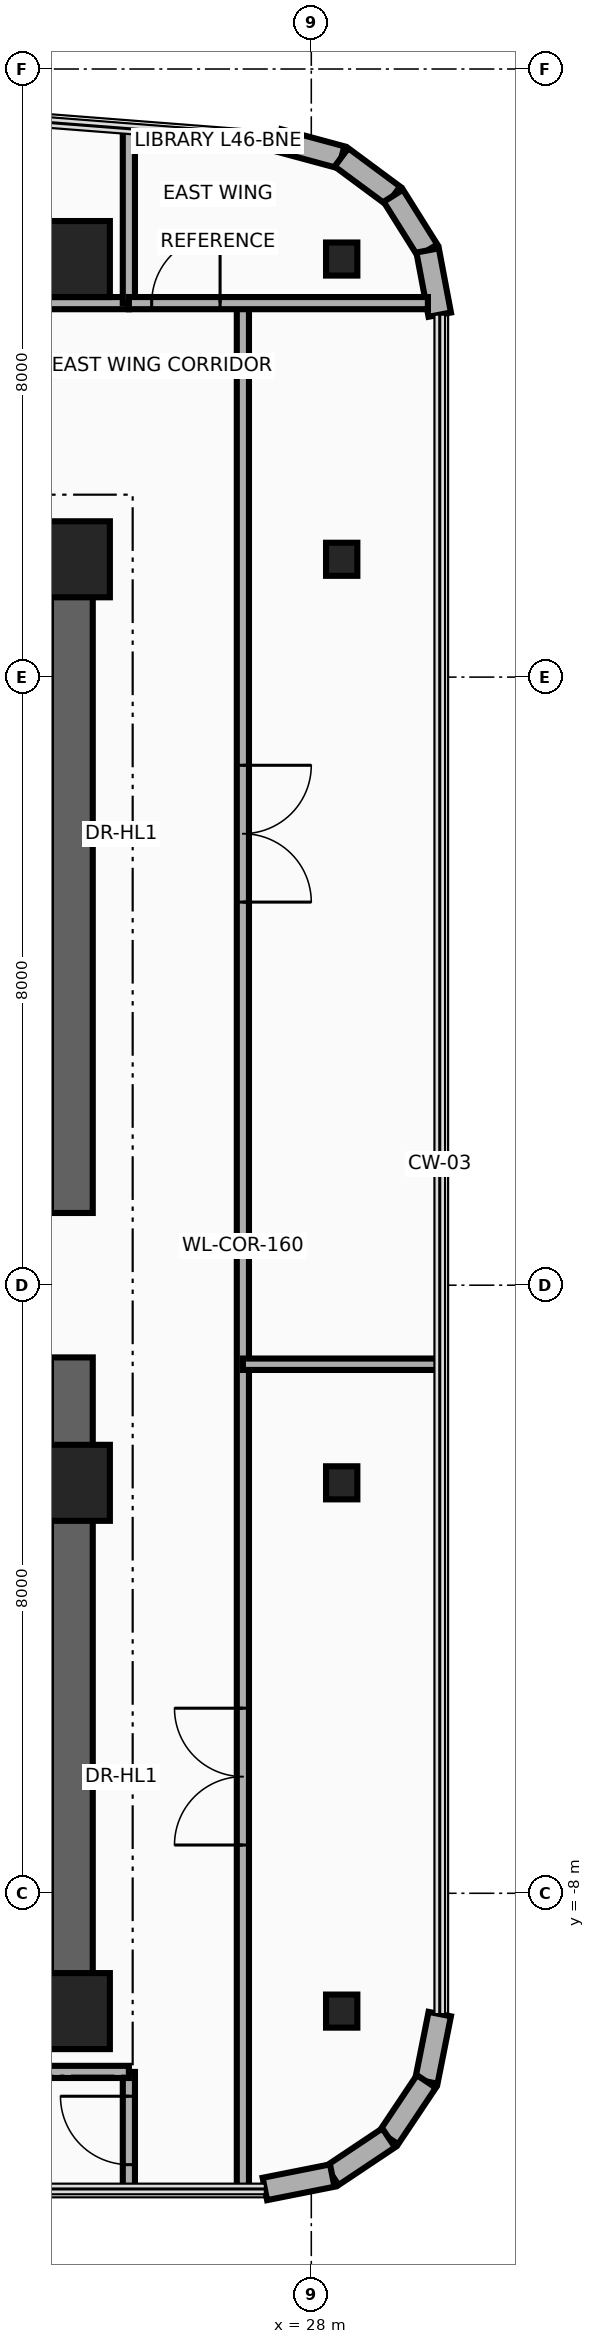
"""IFC4 building model, lengths in metres.
Left out: names, types, materials, properties, quantities, classifications, styles, units other than length and angle.
Written with IfcOpenShell. Run it as: python <this file> out.ifc"""

import sys

from ifc_helpers import new_model, si_unit, direction, frame, frame_2d, origin, origin_2d, place, context, subcontext, project, spatial, rectangle, i_section, extrude, source, transform, mapped, element, fill, save


model = new_model("IFC4")
c1 = context("Model", 3, precision=1e-05, world=origin(), true_north=direction((0.0, 1.0)))
c2 = subcontext(c1, "Body", "Model", "MODEL_VIEW")
j1 = project(units=[si_unit("LENGTHUNIT", "METRE"), si_unit("PLANEANGLEUNIT", "RADIAN")], contexts=[c1])
p1 = place(None, origin())
s1 = spatial("IfcSite", under=j1, at=p1, CompositionType="ELEMENT")
p2 = place(p1, origin())
s2 = spatial("IfcBuilding", under=s1, at=p2, CompositionType="ELEMENT")
p3 = place(p2, frame((0.0, 0.0, 180.5)))
s3 = spatial("IfcBuildingStorey", under=s2, at=p3, CompositionType="ELEMENT", Elevation=180.5)
for number, where, z_axis, x_axis in (
    (1, (24.85, -9.825, 0.0), (0.0, 0.0, 1.0), (0.0, 1.0, 0.0)),
    (2, (24.85, 0.95, 0.0), (0.0, 0.0, 1.0), (0.0, 1.0, 0.0)),
):
    element("IfcWall", number, at=place(p3, frame(where, z_axis=z_axis, x_axis=x_axis)), inside=s3, PredefinedType="SHEAR", context=c2, shape_type="SweptSolid", body=[
        extrude(rectangle(XDim=8.875, YDim=0.55, at=frame_2d((4.438, 0.0))), origin(), (0.0, 0.0, 1.0), 3.63),
    ])
for number, where, z_axis, x_axis in (
    (3, (15.85, 9.55, 0.0), (0.0, 0.0, 1.0), (1.0, 0.0, 0.0)),
    (4, (15.85, -9.55, 0.0), (0.0, 0.0, 1.0), (1.0, 0.0, 0.0)),
):
    element("IfcWall", number, at=place(p3, frame(where, z_axis=z_axis, x_axis=x_axis)), inside=s3, PredefinedType="SHEAR", context=c2, shape_type="SweptSolid", body=[
        extrude(rectangle(XDim=9.0, YDim=0.55, at=frame_2d((4.5, 0.0))), origin(), (0.0, 0.0, 1.0), 3.63),
    ])
m1 = source(origin(), c2, "Body", "SweptSolid", [
    extrude(rectangle(XDim=1.0, YDim=1.0, at=origin_2d()), origin(), (0.0, 0.0, 1.0), 3.95),
])
p4 = place(p3, frame((24.85, -9.55, 0.0), z_axis=(0.0, 0.0, 1.0), x_axis=(1.0, 0.0, 0.0)))
e5 = element("IfcColumn", 5, at=p4, inside=s3, PredefinedType="COLUMN", context=c2, shape_type="MappedRepresentation", body=[
    mapped(m1, transform((0.0, 0.0, 0.0), x_axis=(1.0, 0.0, 0.0), y_axis=(0.0, 1.0, 0.0), z_axis=(0.0, 0.0, 1.0), scale=1.0)),
])
m2 = source(origin(), c2, "Body", "SweptSolid", [
    extrude(i_section(OverallWidth=0.412, OverallDepth=0.435, WebThickness=0.036, FlangeThickness=0.057, at=origin_2d()), origin(), (0.0, 0.0, 1.0), 3.95),
])
p5 = place(p3, frame((28.4, -9.55, 0.0), z_axis=(0.0, 0.0, 1.0), x_axis=(1.0, 0.0, 0.0)))
e6 = element("IfcColumn", 6, at=p5, inside=s3, PredefinedType="COLUMN", context=c2, shape_type="MappedRepresentation", body=[
    mapped(m2, transform((0.0, 0.0, 0.0), x_axis=(1.0, 0.0, 0.0), y_axis=(0.0, 1.0, 0.0), z_axis=(0.0, 0.0, 1.0), scale=1.0)),
])
p6 = place(p3, frame((24.85, -2.6, 0.0), z_axis=(0.0, 0.0, 1.0), x_axis=(1.0, 0.0, 0.0)))
e7 = element("IfcColumn", 7, at=p6, inside=s3, PredefinedType="COLUMN", context=c2, shape_type="MappedRepresentation", body=[
    mapped(m1, transform((0.0, 0.0, 0.0), x_axis=(1.0, 0.0, 0.0), y_axis=(0.0, 1.0, 0.0), z_axis=(0.0, 0.0, 1.0), scale=1.0)),
])
p7 = place(p3, frame((28.4, -2.6, 0.0), z_axis=(0.0, 0.0, 1.0), x_axis=(1.0, 0.0, 0.0)))
e8 = element("IfcColumn", 8, at=p7, inside=s3, PredefinedType="COLUMN", context=c2, shape_type="MappedRepresentation", body=[
    mapped(m2, transform((0.0, 0.0, 0.0), x_axis=(1.0, 0.0, 0.0), y_axis=(0.0, 1.0, 0.0), z_axis=(0.0, 0.0, 1.0), scale=1.0)),
])
p8 = place(p3, frame((24.85, 9.55, 0.0), z_axis=(0.0, 0.0, 1.0), x_axis=(1.0, 0.0, 0.0)))
e9 = element("IfcColumn", 9, at=p8, inside=s3, PredefinedType="COLUMN", context=c2, shape_type="MappedRepresentation", body=[
    mapped(m1, transform((0.0, 0.0, 0.0), x_axis=(1.0, 0.0, 0.0), y_axis=(0.0, 1.0, 0.0), z_axis=(0.0, 0.0, 1.0), scale=1.0)),
])
p9 = place(p3, frame((28.4, 9.55, 0.0), z_axis=(0.0, 0.0, 1.0), x_axis=(1.0, 0.0, 0.0)))
e10 = element("IfcColumn", 10, at=p9, inside=s3, PredefinedType="COLUMN", context=c2, shape_type="MappedRepresentation", body=[
    mapped(m2, transform((0.0, 0.0, 0.0), x_axis=(1.0, 0.0, 0.0), y_axis=(0.0, 1.0, 0.0), z_axis=(0.0, 0.0, 1.0), scale=1.0)),
])
p10 = place(p3, frame((24.85, 13.5, 0.0), z_axis=(0.0, 0.0, 1.0), x_axis=(1.0, 0.0, 0.0)))
e11 = element("IfcColumn", 11, at=p10, inside=s3, PredefinedType="COLUMN", context=c2, shape_type="MappedRepresentation", body=[
    mapped(m1, transform((0.0, 0.0, 0.0), x_axis=(1.0, 0.0, 0.0), y_axis=(0.0, 1.0, 0.0), z_axis=(0.0, 0.0, 1.0), scale=1.0)),
])
p11 = place(p3, frame((28.4, 13.5, 0.0), z_axis=(0.0, 0.0, 1.0), x_axis=(1.0, 0.0, 0.0)))
e12 = element("IfcColumn", 12, at=p11, inside=s3, PredefinedType="COLUMN", context=c2, shape_type="MappedRepresentation", body=[
    mapped(m2, transform((0.0, 0.0, 0.0), x_axis=(1.0, 0.0, 0.0), y_axis=(0.0, 1.0, 0.0), z_axis=(0.0, 0.0, 1.0), scale=1.0)),
])
p12 = place(p3, frame((27.566, 15.062, 0.0), z_axis=(0.0, 0.0, 1.0), x_axis=(0.965357594382, -0.260930479187, 0.0)))
e13 = element("IfcWall", 13, at=p12, inside=s3, PredefinedType="SOLIDWALL", context=c2, shape_type="SweptSolid", body=[
    extrude(rectangle(XDim=0.86, YDim=0.3, at=frame_2d((0.43, 0.0))), origin(), (0.0, 0.0, 1.0), 3.63),
])
p13 = place(p3, frame((28.396, 14.838, 0.0), z_axis=(0.0, 0.0, 1.0), x_axis=(0.803847397988, -0.594835574548, 0.0)))
e14 = element("IfcWall", 14, at=p13, inside=s3, PredefinedType="SOLIDWALL", context=c2, shape_type="SweptSolid", body=[
    extrude(rectangle(XDim=0.849, YDim=0.3, at=frame_2d((0.425, 0.0))), origin(), (0.0, 0.0, 1.0), 3.63),
])
p14 = place(p3, frame((29.079, 14.333, 0.0), z_axis=(0.0, 0.0, 1.0), x_axis=(0.53134147342, -0.847157741288, 0.0)))
e15 = element("IfcWall", 15, at=p14, inside=s3, PredefinedType="SOLIDWALL", context=c2, shape_type="SweptSolid", body=[
    extrude(rectangle(XDim=0.85, YDim=0.3, at=frame_2d((0.425, 0.0))), origin(), (0.0, 0.0, 1.0), 3.63),
])
p15 = place(p3, frame((29.531, 13.613, 0.0), z_axis=(0.0, 0.0, 1.0), x_axis=(0.185402686284, -0.982662629756, 0.0)))
e16 = element("IfcWall", 16, at=p15, inside=s3, PredefinedType="SOLIDWALL", context=c2, shape_type="SweptSolid", body=[
    extrude(rectangle(XDim=0.86, YDim=0.3, at=frame_2d((0.43, 0.0))), origin(), (0.0, 0.0, 1.0), 3.63),
])
p16 = place(p3, frame((29.69, -9.589, 0.0), z_axis=(0.0, 0.0, 1.0), x_axis=(-0.195025152871, -0.980798241101, 0.0)))
e17 = element("IfcWall", 17, at=p16, inside=s3, PredefinedType="SOLIDWALL", context=c2, shape_type="SweptSolid", body=[
    extrude(rectangle(XDim=0.904, YDim=0.3, at=frame_2d((0.452, 0.0))), origin(), (0.0, 0.0, 1.0), 3.63),
])
p17 = place(p3, frame((29.514, -10.476, 0.0), z_axis=(0.0, 0.0, 1.0), x_axis=(-0.555520488502, -0.831502848374, 0.0)))
e18 = element("IfcWall", 18, at=p17, inside=s3, PredefinedType="SOLIDWALL", context=c2, shape_type="SweptSolid", body=[
    extrude(rectangle(XDim=0.893, YDim=0.3, at=frame_2d((0.446, 0.0))), origin(), (0.0, 0.0, 1.0), 3.63),
])
p18 = place(p3, frame((29.018, -11.218, 0.0), z_axis=(0.0, 0.0, 1.0), x_axis=(-0.83158722889, -0.555394167009, 0.0)))
e19 = element("IfcWall", 19, at=p18, inside=s3, PredefinedType="SOLIDWALL", context=c2, shape_type="SweptSolid", body=[
    extrude(rectangle(XDim=0.893, YDim=0.3, at=frame_2d((0.446, 0.0))), origin(), (0.0, 0.0, 1.0), 3.63),
])
p19 = place(p3, frame((28.275, -11.714, 0.0), z_axis=(0.0, 0.0, 1.0), x_axis=(-0.980787963133, -0.19507683454, 0.0)))
e20 = element("IfcWall", 20, at=p19, inside=s3, PredefinedType="SOLIDWALL", context=c2, shape_type="SweptSolid", body=[
    extrude(rectangle(XDim=0.904, YDim=0.3, at=frame_2d((0.452, 0.0))), origin(), (0.0, 0.0, 1.0), 3.63),
])
p20 = place(p3, frame((15.4, 12.92, 0.0), z_axis=(0.0, 0.0, 1.0), x_axis=(1.0, 0.0, 0.0)))
e21 = element("IfcWall", 21, at=p20, inside=s3, PredefinedType="PARTITIONING", context=c2, shape_type="SweptSolid", body=[
    extrude(rectangle(XDim=10.2, YDim=0.16, at=frame_2d((5.1, 0.0))), origin(), (0.0, 0.0, 1.0), 3.004),
])
p21 = place(p20, frame((4.65, 0.0, 0.0)))
e22 = element("IfcOpeningElement", 22, at=p21, cuts=e21, PredefinedType="OPENING", context=c2, shape_type="SweptSolid", body=[
    extrude(rectangle(XDim=0.9, YDim=2.1, at=frame_2d((0.45, 1.05))), frame((0.0, 0.095, 0.0), z_axis=(0.0, -1.0, 0.0), x_axis=(1.0, 0.0, 0.0)), (0.0, 0.0, 1.0), 0.19),
])
p22 = place(p3, frame((25.6, 12.92, 0.0), z_axis=(0.0, 0.0, 1.0), x_axis=(0.0, 1.0, 0.0)))
e23 = element("IfcWall", 23, at=p22, inside=s3, PredefinedType="PARTITIONING", context=c2, shape_type="SweptSolid", body=[
    extrude(rectangle(XDim=2.295, YDim=0.16, at=frame_2d((1.147, 0.0))), origin(), (0.0, 0.0, 1.0), 2.665),
])
p23 = place(p3, frame((25.6, -11.89, 0.0), z_axis=(0.0, 0.0, 1.0), x_axis=(0.0, 1.0, 0.0)))
e24 = element("IfcWall", 24, at=p23, inside=s3, PredefinedType="PARTITIONING", context=c2, shape_type="SweptSolid", body=[
    extrude(rectangle(XDim=1.54, YDim=0.16, at=frame_2d((0.77, 0.0))), origin(), (0.0, 0.0, 1.0), 3.63),
])
p24 = place(p23, frame((0.32, 0.0, 0.0)))
e25 = element("IfcOpeningElement", 25, at=p24, cuts=e24, PredefinedType="OPENING", context=c2, shape_type="SweptSolid", body=[
    extrude(rectangle(XDim=0.9, YDim=2.1, at=frame_2d((0.45, 1.05))), frame((0.0, 0.095, 0.0), z_axis=(0.0, -1.0, 0.0), x_axis=(1.0, 0.0, 0.0)), (0.0, 0.0, 1.0), 0.19),
])
p25 = place(p3, frame((13.889, -10.35, 0.0), z_axis=(0.0, 0.0, 1.0), x_axis=(1.0, 0.0, 0.0)))
e26 = element("IfcWall", 26, at=p25, inside=s3, PredefinedType="PARTITIONING", context=c2, shape_type="SweptSolid", body=[
    extrude(rectangle(XDim=11.711, YDim=0.16, at=frame_2d((5.855, 0.0))), origin(), (0.0, 0.0, 1.0), 3.63),
])
p26 = place(p3, frame((27.1, -11.89, 0.0), z_axis=(0.0, 0.0, 1.0), x_axis=(0.0, 1.0, 0.0)))
e27 = element("IfcWall", 27, at=p26, inside=s3, PredefinedType="PARTITIONING", context=c2, shape_type="SweptSolid", body=[
    extrude(rectangle(XDim=24.81, YDim=0.16, at=frame_2d((12.405, 0.0))), origin(), (0.0, 0.0, 1.0), 2.665),
])
p27 = place(p26, frame((4.525, 0.0, 0.0)))
e28 = element("IfcOpeningElement", 28, at=p27, cuts=e27, PredefinedType="OPENING", context=c2, shape_type="SweptSolid", body=[
    extrude(rectangle(XDim=1.8, YDim=2.15, at=frame_2d((0.9, 1.075))), frame((0.0, 0.095, 0.0), z_axis=(0.0, -1.0, 0.0), x_axis=(1.0, 0.0, 0.0)), (0.0, 0.0, 1.0), 0.19),
])
p28 = place(p26, frame((16.93, 0.0, 0.0)))
e29 = element("IfcOpeningElement", 29, at=p28, cuts=e27, PredefinedType="OPENING", context=c2, shape_type="SweptSolid", body=[
    extrude(rectangle(XDim=1.8, YDim=2.15, at=frame_2d((0.9, 1.075))), frame((0.0, 0.095, 0.0), z_axis=(0.0, -1.0, 0.0), x_axis=(1.0, 0.0, 0.0)), (0.0, 0.0, 1.0), 0.19),
])
p29 = place(p3, frame((25.6, 12.92, 0.0), z_axis=(0.0, 0.0, 1.0), x_axis=(1.0, 0.0, 0.0)))
e30 = element("IfcWall", 30, at=p29, inside=s3, PredefinedType="PARTITIONING", context=c2, shape_type="SweptSolid", body=[
    extrude(rectangle(XDim=3.934, YDim=0.16, at=frame_2d((1.967, 0.0))), origin(), (0.0, 0.0, 1.0), 3.076),
])
p30 = place(p29, frame((0.3, 0.0, 0.0)))
e31 = element("IfcOpeningElement", 31, at=p30, cuts=e30, PredefinedType="OPENING", context=c2, shape_type="SweptSolid", body=[
    extrude(rectangle(XDim=0.9, YDim=2.1, at=frame_2d((0.45, 1.05))), frame((0.0, 0.095, 0.0), z_axis=(0.0, -1.0, 0.0), x_axis=(1.0, 0.0, 0.0)), (0.0, 0.0, 1.0), 0.19),
])
p31 = place(p3, frame((27.1, -1.04, 0.0), z_axis=(0.0, 0.0, 1.0), x_axis=(1.0, 0.0, 0.0)))
e32 = element("IfcWall", 32, at=p31, inside=s3, PredefinedType="PARTITIONING", context=c2, shape_type="SweptSolid", body=[
    extrude(rectangle(XDim=2.59, YDim=0.15, at=frame_2d((1.295, 0.0))), origin(), (0.0, 0.0, 1.0), 3.076),
])
p32 = place(p24, origin())
e33 = element("IfcDoor", 33, at=p32, inside=s3, OperationType="SINGLE_SWING_RIGHT", PredefinedType="DOOR", context=c2, shape_type="SweptSolid", body=[
    extrude(rectangle(XDim=0.9, YDim=2.1, at=frame_2d((0.45, 1.05))), frame((0.0, 0.025, 0.0), z_axis=(0.0, -1.0, 0.0), x_axis=(1.0, 0.0, 0.0)), (0.0, 0.0, 1.0), 0.05),
])
fill(e25, e33)
p33 = place(p30, origin())
e34 = element("IfcDoor", 34, at=p33, inside=s3, OperationType="SINGLE_SWING_LEFT", PredefinedType="DOOR", context=c2, shape_type="SweptSolid", body=[
    extrude(rectangle(XDim=0.9, YDim=2.1, at=frame_2d((0.45, 1.05))), frame((0.0, 0.025, 0.0), z_axis=(0.0, -1.0, 0.0), x_axis=(1.0, 0.0, 0.0)), (0.0, 0.0, 1.0), 0.05),
])
fill(e31, e34)
p34 = place(p27, origin())
e35 = element("IfcDoor", 35, at=p34, inside=s3, OperationType="DOUBLE_DOOR_SINGLE_SWING", PredefinedType="DOOR", context=c2, shape_type="SweptSolid", body=[
    extrude(rectangle(XDim=1.8, YDim=2.15, at=frame_2d((0.9, 1.075))), frame((0.0, 0.025, 0.0), z_axis=(0.0, -1.0, 0.0), x_axis=(1.0, 0.0, 0.0)), (0.0, 0.0, 1.0), 0.05),
])
fill(e28, e35)
p35 = place(p28, frame((1.8, 0.0, 0.0), z_axis=(0.0, 0.0, 1.0), x_axis=(-1.0, 0.0, 0.0)))
e36 = element("IfcDoor", 36, at=p35, inside=s3, OperationType="DOUBLE_DOOR_SINGLE_SWING", PredefinedType="DOOR", context=c2, shape_type="SweptSolid", body=[
    extrude(rectangle(XDim=1.8, YDim=2.15, at=frame_2d((0.9, 1.075))), frame((0.0, 0.025, 0.0), z_axis=(0.0, -1.0, 0.0), x_axis=(1.0, 0.0, 0.0)), (0.0, 0.0, 1.0), 0.05),
])
fill(e29, e36)
save(model, sys.argv[1])
